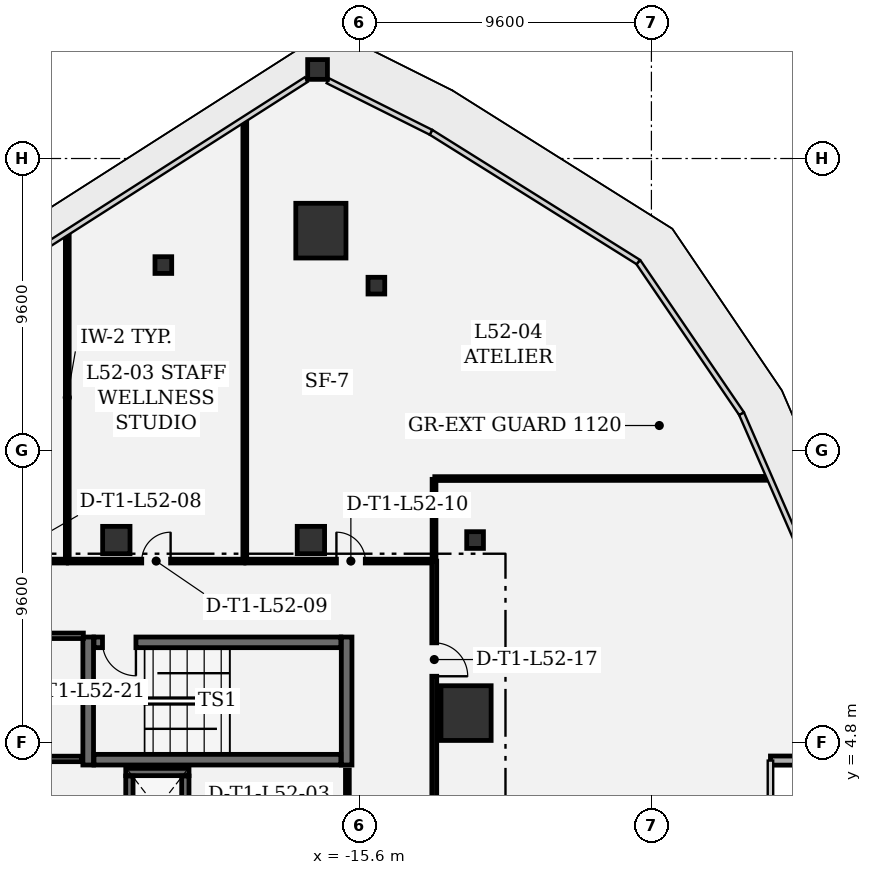
"""IFC4 building model, lengths in metres.
Left out: names, types, materials, properties, quantities, classifications, styles, units other than length and angle.
Written with IfcOpenShell. Run it as: python <this file> out.ifc"""

import sys

from ifc_helpers import new_model, si_unit, direction, frame, frame_2d, origin, origin_2d, place, context, subcontext, project, spatial, rectangle, extrude, element, fill, save


model = new_model("IFC4")
c1 = context("Model", 3, precision=1e-05, world=origin(), true_north=direction((0.0, 1.0)))
c2 = subcontext(c1, "Body", "Model", "MODEL_VIEW")
j1 = project(units=[si_unit("LENGTHUNIT", "METRE"), si_unit("PLANEANGLEUNIT", "RADIAN")], contexts=[c1])
p1 = place(None, origin())
s1 = spatial("IfcSite", under=j1, at=p1, CompositionType="ELEMENT")
p2 = place(p1, origin())
s2 = spatial("IfcBuilding", under=s1, at=p2, CompositionType="ELEMENT")
p3 = place(p2, frame((0.0, 0.0, 225.3)))
s3 = spatial("IfcBuildingStorey", under=s2, at=p3, CompositionType="ELEMENT", Elevation=225.3)
for number, where, z_axis, x_axis in (
    (1, (-12.097, 5.758, 0.0), (0.0, 0.0, 1.0), (1.0, 0.0, 0.0)),
    (2, (-16.872, 21.627, 0.0), (0.0, 0.0, 1.0), (1.0, 0.0, 0.0)),
):
    element("IfcColumn", number, at=place(p3, frame(where, z_axis=z_axis, x_axis=x_axis)), inside=s3, PredefinedType="COLUMN", context=c2, shape_type="SweptSolid", body=[
        extrude(rectangle(XDim=1.65, YDim=1.8, at=origin_2d()), origin(), (0.0, 0.0, 1.0), 4.05),
    ])
for number, where, z_axis, x_axis in (
    (3, (-23.6, 11.45, 0.0), (0.0, 0.0, 1.0), (1.0, 0.0, 0.0)),
    (4, (-17.2, 11.45, 0.0), (0.0, 0.0, 1.0), (1.0, 0.0, 0.0)),
):
    element("IfcColumn", number, at=place(p3, frame(where, z_axis=z_axis, x_axis=x_axis)), inside=s3, PredefinedType="COLUMN", context=c2, shape_type="SweptSolid", body=[
        extrude(rectangle(XDim=0.9, YDim=0.9, at=origin_2d()), origin(), (0.0, 0.0, 1.0), 4.05),
    ])
p4 = place(p3, frame((-16.981, 26.929, 0.0), z_axis=(0.0, 0.0, 1.0), x_axis=(1.0, 0.0, 0.0)))
e5 = element("IfcColumn", 5, at=p4, inside=s3, PredefinedType="COLUMN", context=c2, shape_type="SweptSolid", body=[
    extrude(rectangle(XDim=0.65, YDim=0.65, at=origin_2d()), origin(), (0.0, 0.0, 1.0), 4.05),
])
for number, where, z_axis, x_axis in (
    (6, (-22.053, 20.495, 0.0), (0.0, 0.0, 1.0), (1.0, 0.0, 0.0)),
    (7, (-15.046, 19.818, 0.0), (0.0, 0.0, 1.0), (1.0, 0.0, 0.0)),
    (8, (-11.8, 11.45, 0.0), (0.0, 0.0, 1.0), (1.0, 0.0, 0.0)),
):
    element("IfcColumn", number, at=place(p3, frame(where, z_axis=z_axis, x_axis=x_axis)), inside=s3, PredefinedType="COLUMN", context=c2, shape_type="SweptSolid", body=[
        extrude(rectangle(XDim=0.55, YDim=0.55, at=origin_2d()), origin(), (0.0, 0.0, 1.0), 4.05),
    ])
p5 = place(p3, frame((-2.084, 4.196, 0.0), z_axis=(0.0, 0.0, 1.0), x_axis=(1.0, 0.0, 0.0)))
e9 = element("IfcWall", 9, at=p5, inside=s3, PredefinedType="SOLIDWALL", context=c2, shape_type="SweptSolid", body=[
    extrude(rectangle(XDim=2.797, YDim=0.3, at=frame_2d((1.398, 0.0))), origin(), (0.0, 0.0, 1.0), 3.78),
])
for number, where, z_axis, x_axis in (
    (10, (-24.525, 8.26, 0.0), (0.0, 0.0, 1.0), (0.0, -1.0, 0.0)),
    (11, (-16.025, 4.05, 0.0), (0.0, 0.0, 1.0), (0.0, 1.0, 0.0)),
):
    element("IfcWall", number, at=place(p3, frame(where, z_axis=z_axis, x_axis=x_axis)), inside=s3, PredefinedType="SHEAR", context=c2, shape_type="SweptSolid", body=[
        extrude(rectangle(XDim=4.21, YDim=0.35, at=frame_2d((2.105, 0.0))), origin(), (0.0, 0.0, 1.0), 3.78),
    ])
p6 = place(p3, frame((-24.335, 4.225, 0.0), z_axis=(0.0, 0.0, 1.0), x_axis=(1.0, 0.0, 0.0)))
e12 = element("IfcWall", 12, at=p6, inside=s3, PredefinedType="SHEAR", context=c2, shape_type="SweptSolid", body=[
    extrude(rectangle(XDim=8.12, YDim=0.35, at=frame_2d((4.06, 0.0))), origin(), (0.0, 0.0, 1.0), 3.78),
])
p7 = place(p3, frame((-16.215, 8.085, 0.0), z_axis=(0.0, 0.0, 1.0), x_axis=(-1.0, 0.0, 0.0)))
e13 = element("IfcWall", 13, at=p7, inside=s3, PredefinedType="SHEAR", context=c2, shape_type="SweptSolid", body=[
    extrude(rectangle(XDim=8.12, YDim=0.35, at=frame_2d((4.06, 0.0))), origin(), (0.0, 0.0, 1.0), 3.78),
])
p8 = place(p7, frame((6.74, 0.0, 0.0)))
e14 = element("IfcOpeningElement", 14, at=p8, cuts=e13, PredefinedType="OPENING", context=c2, shape_type="SweptSolid", body=[
    extrude(rectangle(XDim=1.1, YDim=2.2, at=frame_2d((0.55, 1.1))), frame((0.0, 0.185, 0.0), z_axis=(0.0, -1.0, 0.0), x_axis=(1.0, 0.0, 0.0)), (0.0, 0.0, 1.0), 0.37),
])
p9 = place(p3, frame((-23.29, 3.82, 0.0), z_axis=(0.0, 0.0, 1.0), x_axis=(1.0, 0.0, 0.0)))
e15 = element("IfcWall", 15, at=p9, inside=s3, PredefinedType="SHEAR", context=c2, shape_type="SweptSolid", body=[
    extrude(rectangle(XDim=2.08, YDim=0.24, at=frame_2d((1.04, 0.0))), origin(), (0.0, 0.0, 1.0), 3.78),
])
for number, where, z_axis, x_axis in (
    (16, (-23.17, 1.562, 0.0), (0.0, 0.0, 1.0), (0.0, 1.0, 0.0)),
    (17, (-21.33, 3.688, 0.0), (0.0, 0.0, 1.0), (0.0, -1.0, 0.0)),
):
    element("IfcWall", number, at=place(p3, frame(where, z_axis=z_axis, x_axis=x_axis)), inside=s3, PredefinedType="SHEAR", context=c2, shape_type="SweptSolid", body=[
        extrude(rectangle(XDim=2.126, YDim=0.24, at=frame_2d((1.063, 0.0))), origin(), (0.0, 0.0, 1.0), 3.78),
    ])
p10 = place(p3, frame((-28.355, 4.25, 0.0), z_axis=(0.0, 0.0, 1.0), x_axis=(1.0, 0.0, 0.0)))
e18 = element("IfcWall", 18, at=p10, inside=s3, PredefinedType="PARTITIONING", context=c2, shape_type="SweptSolid", body=[
    extrude(rectangle(XDim=3.622, YDim=0.18, at=frame_2d((1.811, 0.0))), origin(), (0.0, 0.0, 1.0), 3.78),
])
p11 = place(p3, frame((-24.684, 8.3, 0.0), z_axis=(0.0, 0.0, 1.0), x_axis=(-1.0, 0.0, 0.0)))
e19 = element("IfcWall", 19, at=p11, inside=s3, PredefinedType="PARTITIONING", context=c2, shape_type="SweptSolid", body=[
    extrude(rectangle(XDim=3.671, YDim=0.18, at=frame_2d((1.835, 0.0))), origin(), (0.0, 0.0, 1.0), 3.78),
])
p12 = place(p11, frame((1.335, 0.0, 0.0)))
e20 = element("IfcOpeningElement", 20, at=p12, cuts=e19, PredefinedType="OPENING", context=c2, shape_type="SweptSolid", body=[
    extrude(rectangle(XDim=1.0, YDim=2.15, at=frame_2d((0.5, 1.075))), frame((0.0, 0.1, 0.0), z_axis=(0.0, -1.0, 0.0), x_axis=(1.0, 0.0, 0.0)), (0.0, 0.0, 1.0), 0.2),
])
p13 = place(p3, frame((-16.0, 1.585, 0.0), z_axis=(0.0, 0.0, 1.0), x_axis=(0.0, 1.0, 0.0)))
e21 = element("IfcWall", 21, at=p13, inside=s3, PredefinedType="PARTITIONING", context=c2, shape_type="SweptSolid", body=[
    extrude(rectangle(XDim=2.302, YDim=0.125, at=frame_2d((1.151, 0.0))), origin(), (0.0, 0.0, 1.0), 3.78),
])
p14 = place(p3, frame((-29.706, 10.758, 0.0), z_axis=(0.0, 0.0, 1.0), x_axis=(1.0, 0.0, 0.0)))
e22 = element("IfcWall", 22, at=p14, inside=s3, PredefinedType="PARTITIONING", context=c2, shape_type="SweptSolid", body=[
    extrude(rectangle(XDim=4.468, YDim=0.125, at=frame_2d((2.234, 0.0))), origin(), (0.0, 0.0, 1.0), 3.78),
])
p15 = place(p14, frame((1.759, 0.0, 0.0)))
e23 = element("IfcOpeningElement", 23, at=p15, cuts=e22, PredefinedType="OPENING", context=c2, shape_type="SweptSolid", body=[
    extrude(rectangle(XDim=0.95, YDim=2.15, at=frame_2d((0.475, 1.075))), frame((0.0, 0.073, 0.0), z_axis=(0.0, -1.0, 0.0), x_axis=(1.0, 0.0, 0.0)), (0.0, 0.0, 1.0), 0.145),
])
p16 = place(p3, frame((-25.213, 10.783, 0.0), z_axis=(0.0, 0.0, 1.0), x_axis=(0.0, 1.0, 0.0)))
e24 = element("IfcWall", 24, at=p16, inside=s3, PredefinedType="PARTITIONING", context=c2, shape_type="SweptSolid", body=[
    extrude(rectangle(XDim=10.71, YDim=0.125, at=frame_2d((5.355, 0.0))), origin(), (0.0, 0.0, 1.0), 3.78),
])
p17 = place(p3, frame((-25.18, 10.758, 0.0), z_axis=(0.0, 0.0, 1.0), x_axis=(1.0, 0.0, 0.0)))
e25 = element("IfcWall", 25, at=p17, inside=s3, PredefinedType="PARTITIONING", context=c2, shape_type="SweptSolid", body=[
    extrude(rectangle(XDim=5.781, YDim=0.125, at=frame_2d((2.89, 0.0))), origin(), (0.0, 0.0, 1.0), 3.78),
])
p18 = place(p17, frame((2.415, 0.0, 0.0)))
e26 = element("IfcOpeningElement", 26, at=p18, cuts=e25, PredefinedType="OPENING", context=c2, shape_type="SweptSolid", body=[
    extrude(rectangle(XDim=0.95, YDim=2.15, at=frame_2d((0.475, 1.075))), frame((0.0, 0.073, 0.0), z_axis=(0.0, -1.0, 0.0), x_axis=(1.0, 0.0, 0.0)), (0.0, 0.0, 1.0), 0.145),
])
p19 = place(p3, frame((-19.374, 10.783, 0.0), z_axis=(0.0, 0.0, 1.0), x_axis=(0.0, 1.0, 0.0)))
e27 = element("IfcWall", 27, at=p19, inside=s3, PredefinedType="PARTITIONING", context=c2, shape_type="SweptSolid", body=[
    extrude(rectangle(XDim=14.442, YDim=0.125, at=frame_2d((7.221, 0.0))), origin(), (0.0, 0.0, 1.0), 2.977),
])
p20 = place(p3, frame((-19.341, 10.758, 0.0), z_axis=(0.0, 0.0, 1.0), x_axis=(1.0, 0.0, 0.0)))
e28 = element("IfcWall", 28, at=p20, inside=s3, PredefinedType="PARTITIONING", context=c2, shape_type="SweptSolid", body=[
    extrude(rectangle(XDim=6.166, YDim=0.125, at=frame_2d((3.083, 0.0))), origin(), (0.0, 0.0, 1.0), 3.344),
])
p21 = place(p20, frame((2.981, 0.0, 0.0)))
e29 = element("IfcOpeningElement", 29, at=p21, cuts=e28, PredefinedType="OPENING", context=c2, shape_type="SweptSolid", body=[
    extrude(rectangle(XDim=0.95, YDim=2.15, at=frame_2d((0.475, 1.075))), frame((0.0, 0.073, 0.0), z_axis=(0.0, -1.0, 0.0), x_axis=(1.0, 0.0, 0.0)), (0.0, 0.0, 1.0), 0.145),
])
p22 = place(p3, frame((-13.15, 13.447, 0.0), z_axis=(0.0, 0.0, 1.0), x_axis=(0.0, -1.0, 0.0)))
e30 = element("IfcWall", 30, at=p22, inside=s3, PredefinedType="PARTITIONING", context=c2, shape_type="SweptSolid", body=[
    extrude(rectangle(XDim=2.664, YDim=0.125, at=frame_2d((1.332, 0.0))), origin(), (0.0, 0.0, 1.0), 3.78),
])
p23 = place(p3, frame((-13.125, 13.472, 0.0), z_axis=(0.0, 0.0, 1.0), x_axis=(0.999999760561, 0.00069201046, 0.0)))
e31 = element("IfcWall", 31, at=p23, inside=s3, PredefinedType="PARTITIONING", context=c2, shape_type="SweptSolid", body=[
    extrude(rectangle(XDim=10.937, YDim=0.125, at=frame_2d((5.468, 0.0))), origin(), (0.0, 0.0, 1.0), 3.78),
])
p24 = place(p3, frame((-13.142, 10.758, 0.0), z_axis=(0.0, 0.0, 1.0), x_axis=(0.0, -1.0, 0.0)))
e32 = element("IfcWall", 32, at=p24, inside=s3, PredefinedType="PARTITIONING", context=c2, shape_type="SweptSolid", body=[
    extrude(rectangle(XDim=8.63, YDim=0.16, at=frame_2d((4.315, 0.0))), origin(), (0.0, 0.0, 1.0), 3.0),
])
p25 = place(p24, frame((2.689, 0.0, 0.0)))
e33 = element("IfcOpeningElement", 33, at=p25, cuts=e32, PredefinedType="OPENING", context=c2, shape_type="SweptSolid", body=[
    extrude(rectangle(XDim=1.1, YDim=2.15, at=frame_2d((0.55, 1.075))), frame((0.0, 0.09, 0.0), z_axis=(0.0, -1.0, 0.0), x_axis=(1.0, 0.0, 0.0)), (0.0, 0.0, 1.0), 0.18),
])
p26 = place(p8, origin())
e34 = element("IfcDoor", 34, at=p26, inside=s3, OperationType="SINGLE_SWING_LEFT", PredefinedType="DOOR", context=c2, shape_type="SweptSolid", body=[
    extrude(rectangle(XDim=1.1, YDim=2.2, at=frame_2d((0.55, 1.1))), frame((0.0, 0.025, 0.0), z_axis=(0.0, -1.0, 0.0), x_axis=(1.0, 0.0, 0.0)), (0.0, 0.0, 1.0), 0.05),
])
fill(e14, e34)
p27 = place(p18, origin())
e35 = element("IfcDoor", 35, at=p27, inside=s3, OperationType="SINGLE_SWING_RIGHT", PredefinedType="DOOR", context=c2, shape_type="SweptSolid", body=[
    extrude(rectangle(XDim=0.95, YDim=2.15, at=frame_2d((0.475, 1.075))), frame((0.0, 0.025, 0.0), z_axis=(0.0, -1.0, 0.0), x_axis=(1.0, 0.0, 0.0)), (0.0, 0.0, 1.0), 0.05),
])
fill(e26, e35)
p28 = place(p21, origin())
e36 = element("IfcDoor", 36, at=p28, inside=s3, OperationType="SINGLE_SWING_LEFT", PredefinedType="DOOR", context=c2, shape_type="SweptSolid", body=[
    extrude(rectangle(XDim=0.95, YDim=2.15, at=frame_2d((0.475, 1.075))), frame((0.0, 0.025, 0.0), z_axis=(0.0, -1.0, 0.0), x_axis=(1.0, 0.0, 0.0)), (0.0, 0.0, 1.0), 0.05),
])
fill(e29, e36)
p29 = place(p25, origin())
e37 = element("IfcDoor", 37, at=p29, inside=s3, OperationType="SINGLE_SWING_RIGHT", PredefinedType="DOOR", context=c2, shape_type="SweptSolid", body=[
    extrude(rectangle(XDim=1.1, YDim=2.15, at=frame_2d((0.55, 1.075))), frame((0.0, 0.025, 0.0), z_axis=(0.0, -1.0, 0.0), x_axis=(1.0, 0.0, 0.0)), (0.0, 0.0, 1.0), 0.05),
])
fill(e33, e37)
save(model, sys.argv[1])
